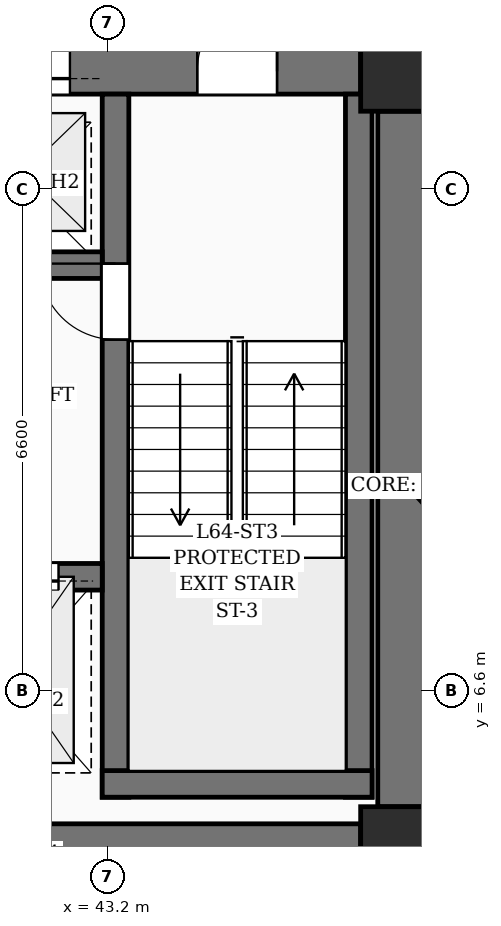
"""IFC4 building model, lengths in metres.
Left out: names, types, materials, properties, quantities, classifications, styles, units other than length and angle.
Written with IfcOpenShell. Run it as: python <this file> out.ifc"""

import sys

from ifc_helpers import new_model, si_unit, direction, frame, frame_2d, origin, origin_2d, place, context, subcontext, project, spatial, rectangle, extrude, element, fill, save


model = new_model("IFC4")
c1 = context("Model", 3, precision=1e-05, world=origin(), true_north=direction((0.0, 1.0)))
c2 = subcontext(c1, "Body", "Model", "MODEL_VIEW")
j1 = project(units=[si_unit("LENGTHUNIT", "METRE"), si_unit("PLANEANGLEUNIT", "RADIAN")], contexts=[c1])
p1 = place(None, origin())
s1 = spatial("IfcSite", under=j1, at=p1, CompositionType="ELEMENT")
p2 = place(p1, origin())
s2 = spatial("IfcBuilding", under=s1, at=p2, CompositionType="ELEMENT")
p3 = place(p2, frame((0.0, 0.0, 248.25)))
s3 = spatial("IfcBuildingStorey", under=s2, at=p3, CompositionType="ELEMENT", Elevation=248.25)
for number, where, z_axis, x_axis in (
    (1, (47.05, 4.55, 0.0), (0.0, 0.0, 1.0), (1.0, 0.0, 0.0)),
    (2, (47.05, 14.75, 0.0), (0.0, 0.0, 1.0), (1.0, 0.0, 0.0)),
):
    element("IfcColumn", number, at=place(p3, frame(where, z_axis=z_axis, x_axis=x_axis)), inside=s3, PredefinedType="COLUMN", context=c2, shape_type="SweptSolid", body=[
        extrude(rectangle(XDim=1.05, YDim=1.05, at=origin_2d()), origin(), (0.0, 0.0, 1.0), 3.75),
    ])
p4 = place(p3, frame((35.675, 4.55, 0.0), z_axis=(0.0, 0.0, 1.0), x_axis=(1.0, 0.0, 0.0)))
e3 = element("IfcWall", 3, at=p4, inside=s3, PredefinedType="SHEAR", context=c2, shape_type="SweptSolid", body=[
    extrude(rectangle(XDim=10.85, YDim=0.6, at=frame_2d((5.425, 0.0))), origin(), (0.0, 0.0, 1.0), 3.75),
])
p5 = place(p3, frame((35.675, 14.75, 0.0), z_axis=(0.0, 0.0, 1.0), x_axis=(1.0, 0.0, 0.0)))
e4 = element("IfcWall", 4, at=p5, inside=s3, PredefinedType="SHEAR", context=c2, shape_type="SweptSolid", body=[
    extrude(rectangle(XDim=10.85, YDim=0.6, at=frame_2d((5.425, 0.0))), origin(), (0.0, 0.0, 1.0), 3.75),
])
p6 = place(p5, frame((1.1, 0.0, 0.0)))
e5 = element("IfcOpeningElement", 5, at=p6, cuts=e4, PredefinedType="OPENING", context=c2, shape_type="SweptSolid", body=[
    extrude(rectangle(XDim=1.05, YDim=2.15, at=frame_2d((0.525, 1.075))), frame((0.0, 0.31, 0.0), z_axis=(0.0, -1.0, 0.0), x_axis=(1.0, 0.0, 0.0)), (0.0, 0.0, 1.0), 0.62),
])
p7 = place(p5, frame((8.7, 0.0, 0.0)))
e6 = element("IfcOpeningElement", 6, at=p7, cuts=e4, PredefinedType="OPENING", context=c2, shape_type="SweptSolid", body=[
    extrude(rectangle(XDim=1.05, YDim=2.15, at=frame_2d((0.525, 1.075))), frame((0.0, 0.31, 0.0), z_axis=(0.0, -1.0, 0.0), x_axis=(1.0, 0.0, 0.0)), (0.0, 0.0, 1.0), 0.62),
])
p8 = place(p5, frame((3.825, 0.0, 0.0)))
e7 = element("IfcOpeningElement", 7, at=p8, cuts=e4, PredefinedType="OPENING", context=c2, shape_type="SweptSolid", body=[
    extrude(rectangle(XDim=1.2, YDim=2.2, at=frame_2d((0.6, 1.1))), frame((0.0, 0.31, 0.0), z_axis=(0.0, -1.0, 0.0), x_axis=(1.0, 0.0, 0.0)), (0.0, 0.0, 1.0), 0.62),
])
p9 = place(p5, frame((5.825, 0.0, 0.0)))
e8 = element("IfcOpeningElement", 8, at=p9, cuts=e4, PredefinedType="OPENING", context=c2, shape_type="SweptSolid", body=[
    extrude(rectangle(XDim=1.2, YDim=2.2, at=frame_2d((0.6, 1.1))), frame((0.0, 0.31, 0.0), z_axis=(0.0, -1.0, 0.0), x_axis=(1.0, 0.0, 0.0)), (0.0, 0.0, 1.0), 0.62),
])
p10 = place(p3, frame((47.05, 5.075, 0.0), z_axis=(0.0, 0.0, 1.0), x_axis=(0.0, 1.0, 0.0)))
e9 = element("IfcWall", 9, at=p10, inside=s3, PredefinedType="SHEAR", context=c2, shape_type="SweptSolid", body=[
    extrude(rectangle(XDim=9.15, YDim=0.6, at=frame_2d((4.575, 0.0))), origin(), (0.0, 0.0, 1.0), 3.75),
])
p11 = place(p3, frame((43.3, 5.2, 0.0), z_axis=(0.0, 0.0, 1.0), x_axis=(0.0, 1.0, 0.0)))
e10 = element("IfcWall", 10, at=p11, inside=s3, PredefinedType="SOLIDWALL", context=c2, shape_type="SweptSolid", body=[
    extrude(rectangle(XDim=9.25, YDim=0.35, at=frame_2d((4.625, 0.0))), origin(), (0.0, 0.0, 1.0), 3.75),
])
p12 = place(p11, frame((6.02, 0.0, 0.0)))
e11 = element("IfcOpeningElement", 11, at=p12, cuts=e10, PredefinedType="OPENING", context=c2, shape_type="SweptSolid", body=[
    extrude(rectangle(XDim=1.0, YDim=2.15, at=frame_2d((0.5, 1.075))), frame((0.0, 0.185, 0.0), z_axis=(0.0, -1.0, 0.0), x_axis=(1.0, 0.0, 0.0)), (0.0, 0.0, 1.0), 0.37),
])
p13 = place(p3, frame((46.5, 5.2, 0.0), z_axis=(0.0, 0.0, 1.0), x_axis=(0.0, 1.0, 0.0)))
e12 = element("IfcWall", 12, at=p13, inside=s3, PredefinedType="SOLIDWALL", context=c2, shape_type="SweptSolid", body=[
    extrude(rectangle(XDim=9.25, YDim=0.35, at=frame_2d((4.625, 0.0))), origin(), (0.0, 0.0, 1.0), 3.75),
])
p14 = place(p3, frame((43.125, 5.375, 0.0), z_axis=(0.0, 0.0, 1.0), x_axis=(1.0, 0.0, 0.0)))
e13 = element("IfcWall", 13, at=p14, inside=s3, PredefinedType="SOLIDWALL", context=c2, shape_type="SweptSolid", body=[
    extrude(rectangle(XDim=3.55, YDim=0.35, at=frame_2d((1.775, 0.0))), origin(), (0.0, 0.0, 1.0), 3.75),
])
p15 = place(p3, frame((40.55, 8.1, 0.0), z_axis=(0.0, 0.0, 1.0), x_axis=(1.0, 0.0, 0.0)))
e14 = element("IfcWall", 14, at=p15, inside=s3, PredefinedType="SOLIDWALL", context=c2, shape_type="SweptSolid", body=[
    extrude(rectangle(XDim=2.575, YDim=0.35, at=frame_2d((1.288, 0.0))), origin(), (0.0, 0.0, 1.0), 3.75),
])
p16 = place(p15, frame((0.7, 0.0, 0.0)))
e15 = element("IfcOpeningElement", 15, at=p16, cuts=e14, PredefinedType="OPENING", context=c2, shape_type="SweptSolid", body=[
    extrude(rectangle(XDim=1.3, YDim=2.25, at=frame_2d((0.65, 1.125))), frame((0.0, 0.185, 0.0), z_axis=(0.0, -1.0, 0.0), x_axis=(1.0, 0.0, 0.0)), (0.0, 0.0, 1.0), 0.37),
])
p17 = place(p3, frame((39.075, 12.2, 0.0), z_axis=(0.0, 0.0, 1.0), x_axis=(1.0, 0.0, 0.0)))
e16 = element("IfcWall", 16, at=p17, inside=s3, PredefinedType="SOLIDWALL", context=c2, shape_type="SweptSolid", body=[
    extrude(rectangle(XDim=4.05, YDim=0.35, at=frame_2d((2.025, 0.0))), origin(), (0.0, 0.0, 1.0), 3.75),
])
p18 = place(p3, frame((50.542, 5.723, 0.0), z_axis=(0.0, 0.0, 1.0), x_axis=(-0.67522874339, 0.737608394814, 0.0)))
e17 = element("IfcWall", 17, at=p18, inside=s3, PredefinedType="PARTITIONING", context=c2, shape_type="SweptSolid", body=[
    extrude(rectangle(XDim=4.728, YDim=0.2, at=frame_2d((2.364, 0.0))), origin(), (0.0, 0.0, 1.0), 2.685),
])
p19 = place(p18, frame((1.822, 0.0, 0.0)))
e18 = element("IfcOpeningElement", 18, at=p19, cuts=e17, PredefinedType="OPENING", context=c2, shape_type="SweptSolid", body=[
    extrude(rectangle(XDim=1.0, YDim=2.2, at=frame_2d((0.5, 1.1))), frame((0.0, 0.11, 0.0), z_axis=(0.0, -1.0, 0.0), x_axis=(1.0, 0.0, 0.0)), (0.0, 0.0, 1.0), 0.22),
])
p20 = place(p7, origin())
e19 = element("IfcDoor", 19, at=p20, inside=s3, OperationType="SINGLE_SWING_RIGHT", PredefinedType="DOOR", context=c2, shape_type="SweptSolid", body=[
    extrude(rectangle(XDim=1.05, YDim=2.15, at=frame_2d((0.525, 1.075))), frame((0.0, 0.025, 0.0), z_axis=(0.0, -1.0, 0.0), x_axis=(1.0, 0.0, 0.0)), (0.0, 0.0, 1.0), 0.05),
])
fill(e6, e19)
p21 = place(p12, origin())
e20 = element("IfcDoor", 20, at=p21, inside=s3, OperationType="SINGLE_SWING_RIGHT", PredefinedType="DOOR", context=c2, shape_type="SweptSolid", body=[
    extrude(rectangle(XDim=1.0, YDim=2.15, at=frame_2d((0.5, 1.075))), frame((0.0, 0.025, 0.0), z_axis=(0.0, -1.0, 0.0), x_axis=(1.0, 0.0, 0.0)), (0.0, 0.0, 1.0), 0.05),
])
fill(e11, e20)
p22 = place(p16, origin())
e21 = element("IfcDoor", 21, at=p22, inside=s3, OperationType="DOUBLE_DOOR_SLIDING", PredefinedType="DOOR", context=c2, shape_type="SweptSolid", body=[
    extrude(rectangle(XDim=1.3, YDim=2.25, at=frame_2d((0.65, 1.125))), frame((0.0, 0.025, 0.0), z_axis=(0.0, -1.0, 0.0), x_axis=(1.0, 0.0, 0.0)), (0.0, 0.0, 1.0), 0.05),
])
fill(e15, e21)
p23 = place(p9, origin())
e22 = element("IfcDoor", 22, at=p23, inside=s3, OperationType="DOUBLE_DOOR_SLIDING", PredefinedType="DOOR", context=c2, shape_type="SweptSolid", body=[
    extrude(rectangle(XDim=1.2, YDim=2.2, at=frame_2d((0.6, 1.1))), frame((0.0, 0.025, 0.0), z_axis=(0.0, -1.0, 0.0), x_axis=(1.0, 0.0, 0.0)), (0.0, 0.0, 1.0), 0.05),
])
fill(e8, e22)
save(model, sys.argv[1])
